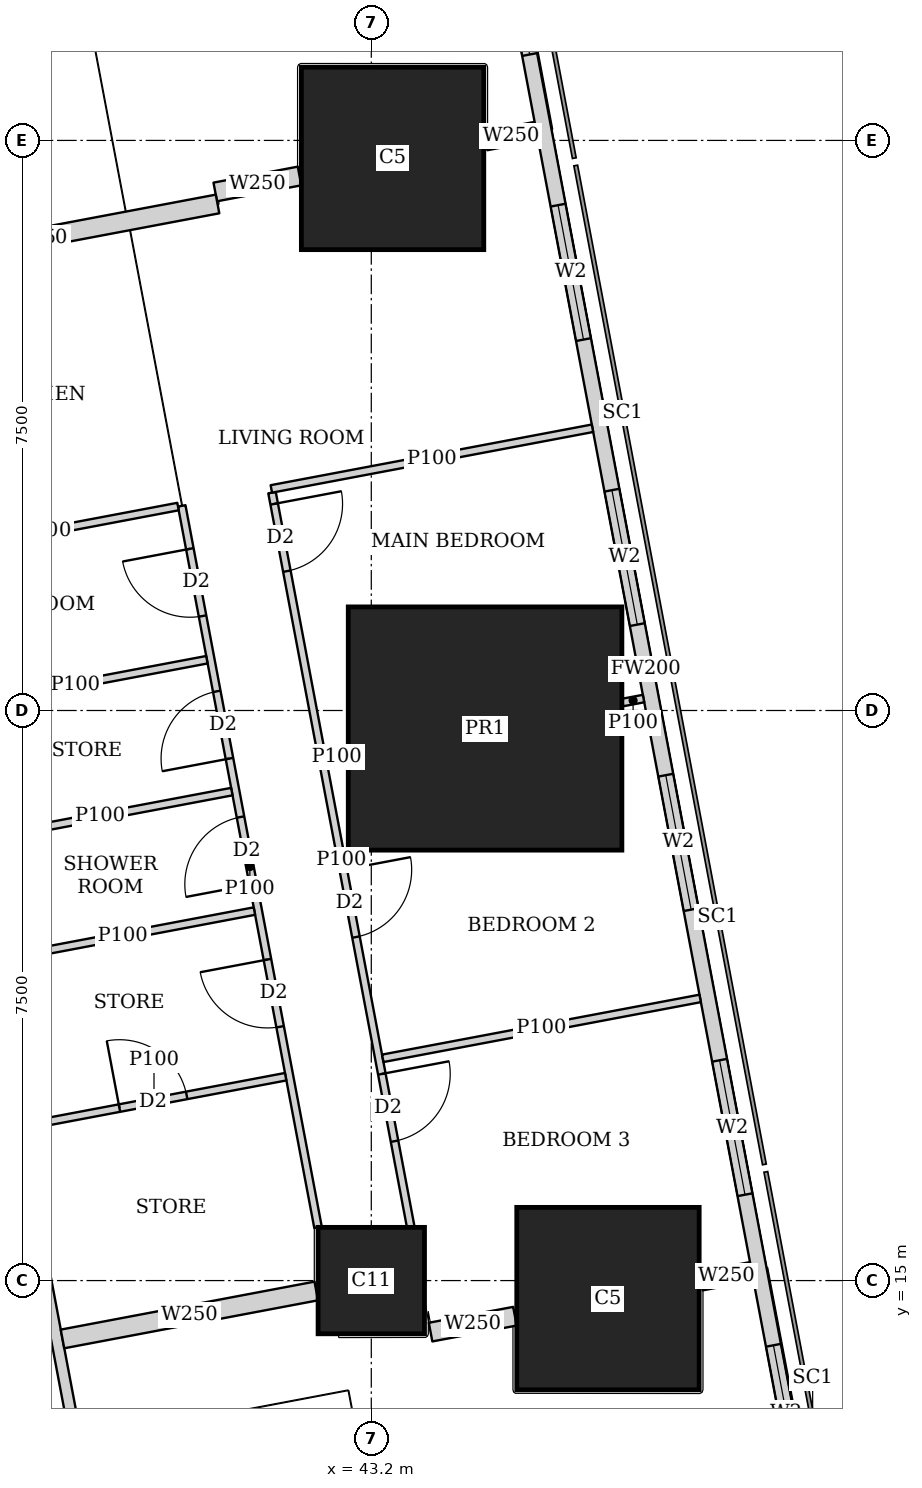
"""IFC4 building model, lengths in metres.
Left out: names, types, materials, properties, quantities, classifications, styles, units other than length and angle.
Written with IfcOpenShell. Run it as: python <this file> out.ifc"""

import sys

from ifc_helpers import new_model, si_unit, direction, frame, frame_2d, origin, origin_2d, place, context, subcontext, project, spatial, rectangle, extrude, element, fill, save


model = new_model("IFC4")
c1 = context("Model", 3, precision=1e-05, world=origin(), true_north=direction((0.0, 1.0)))
c2 = subcontext(c1, "Body", "Model", "MODEL_VIEW")
j1 = project(units=[si_unit("LENGTHUNIT", "METRE"), si_unit("PLANEANGLEUNIT", "RADIAN")], contexts=[c1])
p1 = place(None, origin())
s1 = spatial("IfcSite", under=j1, at=p1, CompositionType="ELEMENT")
p2 = place(p1, origin())
s2 = spatial("IfcBuilding", under=s1, at=p2, CompositionType="ELEMENT")
p3 = place(p2, frame((0.0, 0.0, 212.45)))
s3 = spatial("IfcBuildingStorey", under=s2, at=p3, CompositionType="ELEMENT", Elevation=212.45)
p4 = place(p3, frame((43.2, 15.0, 0.0), z_axis=(0.0, 0.0, 1.0), x_axis=(1.0, 0.0, 0.0)))
e1 = element("IfcColumn", 1, at=p4, inside=s3, PredefinedType="COLUMN", context=c2, shape_type="SweptSolid", body=[
    extrude(rectangle(XDim=1.4, YDim=1.4, at=origin_2d()), origin(), (0.0, 0.0, 1.0), 3.75),
])
p5 = place(p3, frame((46.314, 14.763, 0.0), z_axis=(0.0, 0.0, 1.0), x_axis=(1.0, 0.0, 0.0)))
e2 = element("IfcColumn", 2, at=p5, inside=s3, PredefinedType="COLUMN", context=c2, shape_type="SweptSolid", body=[
    extrude(rectangle(XDim=2.4, YDim=2.4, at=origin_2d()), origin(), (0.0, 0.0, 1.0), 3.75),
])
p6 = place(p3, frame((44.697, 22.263, 0.0), z_axis=(0.0, 0.0, 1.0), x_axis=(1.0, 0.0, 0.0)))
e3 = element("IfcColumn", 3, at=p6, inside=s3, PredefinedType="COLUMN", context=c2, shape_type="SweptSolid", body=[
    extrude(rectangle(XDim=3.6, YDim=3.2, at=origin_2d()), origin(), (0.0, 0.0, 1.0), 3.75),
])
p7 = place(p3, frame((43.48, 29.763, 0.0), z_axis=(0.0, 0.0, 1.0), x_axis=(1.0, 0.0, 0.0)))
e4 = element("IfcColumn", 4, at=p7, inside=s3, PredefinedType="COLUMN", context=c2, shape_type="SweptSolid", body=[
    extrude(rectangle(XDim=2.4, YDim=2.4, at=origin_2d()), origin(), (0.0, 0.0, 1.0), 3.75),
])
p8 = place(p3, frame((50.653, 2.703, 0.0), z_axis=(0.0, 0.0, 1.0), x_axis=(-0.185612026696, 0.982623109613, 0.0)))
e5 = element("IfcWall", 5, at=p8, inside=s3, PredefinedType="SOLIDWALL", context=c2, shape_type="SweptSolid", body=[
    extrude(rectangle(XDim=41.393, YDim=0.2, at=frame_2d((20.697, 0.0))), origin(), (0.0, 0.0, 1.0), 3.5),
])
p9 = place(p8, frame((1.633, 0.0, 0.9)))
e6 = element("IfcOpeningElement", 6, at=p9, cuts=e5, PredefinedType="OPENING", context=c2, shape_type="SweptSolid", body=[
    extrude(rectangle(XDim=1.8, YDim=1.5, at=frame_2d((0.9, 0.75))), frame((0.0, 0.11, 0.0), z_axis=(0.0, -1.0, 0.0), x_axis=(1.0, 0.0, 0.0)), (0.0, 0.0, 1.0), 0.22),
])
p10 = place(p8, frame((6.032, 0.0, 0.9)))
e7 = element("IfcOpeningElement", 7, at=p10, cuts=e5, PredefinedType="OPENING", context=c2, shape_type="SweptSolid", body=[
    extrude(rectangle(XDim=1.8, YDim=1.5, at=frame_2d((0.9, 0.75))), frame((0.0, 0.11, 0.0), z_axis=(0.0, -1.0, 0.0), x_axis=(1.0, 0.0, 0.0)), (0.0, 0.0, 1.0), 0.22),
])
p11 = place(p8, frame((9.848, 0.0, 0.9)))
e8 = element("IfcOpeningElement", 8, at=p11, cuts=e5, PredefinedType="OPENING", context=c2, shape_type="SweptSolid", body=[
    extrude(rectangle(XDim=1.8, YDim=1.5, at=frame_2d((0.9, 0.75))), frame((0.0, 0.11, 0.0), z_axis=(0.0, -1.0, 0.0), x_axis=(1.0, 0.0, 0.0)), (0.0, 0.0, 1.0), 0.22),
])
p12 = place(p8, frame((13.664, 0.0, 0.9)))
e9 = element("IfcOpeningElement", 9, at=p12, cuts=e5, PredefinedType="OPENING", context=c2, shape_type="SweptSolid", body=[
    extrude(rectangle(XDim=1.8, YDim=1.5, at=frame_2d((0.9, 0.75))), frame((0.0, 0.11, 0.0), z_axis=(0.0, -1.0, 0.0), x_axis=(1.0, 0.0, 0.0)), (0.0, 0.0, 1.0), 0.22),
])
p13 = place(p8, frame((17.481, 0.0, 0.9)))
e10 = element("IfcOpeningElement", 10, at=p13, cuts=e5, PredefinedType="OPENING", context=c2, shape_type="SweptSolid", body=[
    extrude(rectangle(XDim=1.8, YDim=1.5, at=frame_2d((0.9, 0.75))), frame((0.0, 0.11, 0.0), z_axis=(0.0, -1.0, 0.0), x_axis=(1.0, 0.0, 0.0)), (0.0, 0.0, 1.0), 0.22),
])
p14 = place(p8, frame((21.297, 0.0, 0.9)))
e11 = element("IfcOpeningElement", 11, at=p14, cuts=e5, PredefinedType="OPENING", context=c2, shape_type="SweptSolid", body=[
    extrude(rectangle(XDim=1.8, YDim=1.5, at=frame_2d((0.9, 0.75))), frame((0.0, 0.11, 0.0), z_axis=(0.0, -1.0, 0.0), x_axis=(1.0, 0.0, 0.0)), (0.0, 0.0, 1.0), 0.22),
])
p15 = place(p8, frame((25.113, 0.0, 0.9)))
e12 = element("IfcOpeningElement", 12, at=p15, cuts=e5, PredefinedType="OPENING", context=c2, shape_type="SweptSolid", body=[
    extrude(rectangle(XDim=1.8, YDim=1.5, at=frame_2d((0.9, 0.75))), frame((0.0, 0.11, 0.0), z_axis=(0.0, -1.0, 0.0), x_axis=(1.0, 0.0, 0.0)), (0.0, 0.0, 1.0), 0.22),
])
p16 = place(p8, frame((28.93, 0.0, 0.9)))
e13 = element("IfcOpeningElement", 13, at=p16, cuts=e5, PredefinedType="OPENING", context=c2, shape_type="SweptSolid", body=[
    extrude(rectangle(XDim=1.8, YDim=1.5, at=frame_2d((0.9, 0.75))), frame((0.0, 0.11, 0.0), z_axis=(0.0, -1.0, 0.0), x_axis=(1.0, 0.0, 0.0)), (0.0, 0.0, 1.0), 0.22),
])
p17 = place(p8, frame((32.746, 0.0, 0.9)))
e14 = element("IfcOpeningElement", 14, at=p17, cuts=e5, PredefinedType="OPENING", context=c2, shape_type="SweptSolid", body=[
    extrude(rectangle(XDim=1.8, YDim=1.5, at=frame_2d((0.9, 0.75))), frame((0.0, 0.11, 0.0), z_axis=(0.0, -1.0, 0.0), x_axis=(1.0, 0.0, 0.0)), (0.0, 0.0, 1.0), 0.22),
])
p18 = place(p8, frame((36.481, 0.0, 0.9)))
e15 = element("IfcOpeningElement", 15, at=p18, cuts=e5, PredefinedType="OPENING", context=c2, shape_type="SweptSolid", body=[
    extrude(rectangle(XDim=1.8, YDim=1.5, at=frame_2d((0.9, 0.75))), frame((0.0, 0.11, 0.0), z_axis=(0.0, -1.0, 0.0), x_axis=(1.0, 0.0, 0.0)), (0.0, 0.0, 1.0), 0.22),
])
p19 = place(p3, frame((33.68, 42.723, 0.0), z_axis=(0.0, 0.0, 1.0), x_axis=(0.185601160014, -0.982625162207, 0.0)))
e16 = element("IfcWall", 16, at=p19, inside=s3, PredefinedType="SOLIDWALL", context=c2, shape_type="SweptSolid", body=[
    extrude(rectangle(XDim=41.051, YDim=0.15, at=frame_2d((20.526, 0.0))), origin(), (0.0, 0.0, 1.0), 2.5),
])
p20 = place(p19, frame((12.307, 0.0, 0.0)))
e17 = element("IfcOpeningElement", 17, at=p20, cuts=e16, PredefinedType="OPENING", context=c2, shape_type="SweptSolid", body=[
    extrude(rectangle(XDim=1.0, YDim=2.1, at=frame_2d((0.5, 1.05))), frame((0.0, 0.085, 0.0), z_axis=(0.0, -1.0, 0.0), x_axis=(1.0, 0.0, 0.0)), (0.0, 0.0, 1.0), 0.17),
])
p21 = place(p19, frame((16.123, 0.0, 0.0)))
e18 = element("IfcOpeningElement", 18, at=p21, cuts=e16, PredefinedType="OPENING", context=c2, shape_type="SweptSolid", body=[
    extrude(rectangle(XDim=1.0, YDim=2.1, at=frame_2d((0.5, 1.05))), frame((0.0, 0.085, 0.0), z_axis=(0.0, -1.0, 0.0), x_axis=(1.0, 0.0, 0.0)), (0.0, 0.0, 1.0), 0.17),
])
p22 = place(p19, frame((30.902, 0.0, 0.0)))
e19 = element("IfcOpeningElement", 19, at=p22, cuts=e16, PredefinedType="OPENING", context=c2, shape_type="SweptSolid", body=[
    extrude(rectangle(XDim=1.0, YDim=2.1, at=frame_2d((0.5, 1.05))), frame((0.0, 0.085, 0.0), z_axis=(0.0, -1.0, 0.0), x_axis=(1.0, 0.0, 0.0)), (0.0, 0.0, 1.0), 0.17),
])
p23 = place(p3, frame((41.894, 25.366, 0.0), z_axis=(0.0, 0.0, 1.0), x_axis=(0.185612905165, -0.982622943675, 0.0)))
e20 = element("IfcWall", 20, at=p23, inside=s3, PredefinedType="PARTITIONING", context=c2, shape_type="SweptSolid", body=[
    extrude(rectangle(XDim=9.827, YDim=0.1, at=frame_2d((4.913, 0.0))), origin(), (0.0, 0.0, 1.0), 2.5),
])
p24 = place(p23, frame((0.151, 0.0, 0.0)))
e21 = element("IfcOpeningElement", 21, at=p24, cuts=e20, PredefinedType="OPENING", context=c2, shape_type="SweptSolid", body=[
    extrude(rectangle(XDim=0.9, YDim=2.1, at=frame_2d((0.45, 1.05))), frame((0.0, 0.06, 0.0), z_axis=(0.0, -1.0, 0.0), x_axis=(1.0, 0.0, 0.0)), (0.0, 0.0, 1.0), 0.12),
])
p25 = place(p23, frame((5.05, 0.0, 0.0)))
e22 = element("IfcOpeningElement", 22, at=p25, cuts=e20, PredefinedType="OPENING", context=c2, shape_type="SweptSolid", body=[
    extrude(rectangle(XDim=0.9, YDim=2.1, at=frame_2d((0.45, 1.05))), frame((0.0, 0.06, 0.0), z_axis=(0.0, -1.0, 0.0), x_axis=(1.0, 0.0, 0.0)), (0.0, 0.0, 1.0), 0.12),
])
p26 = place(p23, frame((7.783, 0.0, 0.0)))
e23 = element("IfcOpeningElement", 23, at=p26, cuts=e20, PredefinedType="OPENING", context=c2, shape_type="SweptSolid", body=[
    extrude(rectangle(XDim=0.9, YDim=2.1, at=frame_2d((0.45, 1.05))), frame((0.0, 0.06, 0.0), z_axis=(0.0, -1.0, 0.0), x_axis=(1.0, 0.0, 0.0)), (0.0, 0.0, 1.0), 0.12),
])
p27 = place(p3, frame((40.706, 25.192, 0.0), z_axis=(0.0, 0.0, 1.0), x_axis=(0.185629824463, -0.982619747547, 0.0)))
e24 = element("IfcWall", 24, at=p27, inside=s3, PredefinedType="PARTITIONING", context=c2, shape_type="SweptSolid", body=[
    extrude(rectangle(XDim=9.659, YDim=0.1, at=frame_2d((4.83, 0.0))), origin(), (0.0, 0.0, 1.0), 2.5),
])
p28 = place(p27, frame((0.575, 0.0, 0.0)))
e25 = element("IfcOpeningElement", 25, at=p28, cuts=e24, PredefinedType="OPENING", context=c2, shape_type="SweptSolid", body=[
    extrude(rectangle(XDim=0.9, YDim=2.1, at=frame_2d((0.45, 1.05))), frame((0.0, 0.06, 0.0), z_axis=(0.0, -1.0, 0.0), x_axis=(1.0, 0.0, 0.0)), (0.0, 0.0, 1.0), 0.12),
])
p29 = place(p27, frame((4.166, 0.0, 0.0)))
e26 = element("IfcOpeningElement", 26, at=p29, cuts=e24, PredefinedType="OPENING", context=c2, shape_type="SweptSolid", body=[
    extrude(rectangle(XDim=0.9, YDim=2.1, at=frame_2d((0.45, 1.05))), frame((0.0, 0.06, 0.0), z_axis=(0.0, -1.0, 0.0), x_axis=(1.0, 0.0, 0.0)), (0.0, 0.0, 1.0), 0.12),
])
p30 = place(p27, frame((2.483, 0.0, 0.0)))
e27 = element("IfcOpeningElement", 27, at=p30, cuts=e24, PredefinedType="OPENING", context=c2, shape_type="SweptSolid", body=[
    extrude(rectangle(XDim=0.9, YDim=2.1, at=frame_2d((0.45, 1.05))), frame((0.0, 0.06, 0.0), z_axis=(0.0, -1.0, 0.0), x_axis=(1.0, 0.0, 0.0)), (0.0, 0.0, 1.0), 0.12),
])
p31 = place(p27, frame((6.074, 0.0, 0.0)))
e28 = element("IfcOpeningElement", 28, at=p31, cuts=e24, PredefinedType="OPENING", context=c2, shape_type="SweptSolid", body=[
    extrude(rectangle(XDim=0.9, YDim=2.1, at=frame_2d((0.45, 1.05))), frame((0.0, 0.06, 0.0), z_axis=(0.0, -1.0, 0.0), x_axis=(1.0, 0.0, 0.0)), (0.0, 0.0, 1.0), 0.12),
])
p32 = place(p3, frame((46.11, 26.213, 0.0), z_axis=(0.0, 0.0, 1.0), x_axis=(-0.982633535512, -0.185556823879, 0.0)))
e29 = element("IfcWall", 29, at=p32, inside=s3, PredefinedType="PARTITIONING", context=c2, shape_type="SweptSolid", body=[
    extrude(rectangle(XDim=4.3, YDim=0.1, at=frame_2d((2.15, 0.0))), origin(), (0.0, 0.0, 1.0), 2.05),
])
p33 = place(p3, frame((46.782, 22.657, 0.0), z_axis=(0.0, 0.0, 1.0), x_axis=(-0.982574553168, -0.185868898601, 0.0)))
e30 = element("IfcWall", 30, at=p33, inside=s3, PredefinedType="PARTITIONING", context=c2, shape_type="SweptSolid", body=[
    extrude(rectangle(XDim=0.28, YDim=0.1, at=frame_2d((0.14, 0.0))), origin(), (0.0, 0.0, 1.0), 3.5),
])
p34 = place(p3, frame((42.887, 21.921, 0.0), z_axis=(0.0, 0.0, 1.0), x_axis=(-0.982688058078, -0.185267861514, 0.0)))
e31 = element("IfcWall", 31, at=p34, inside=s3, PredefinedType="PARTITIONING", context=c2, shape_type="SweptSolid", body=[
    extrude(rectangle(XDim=0.286, YDim=0.1, at=frame_2d((0.143, 0.0))), origin(), (0.0, 0.0, 1.0), 2.5),
])
p35 = place(p3, frame((47.527, 18.712, 0.0), z_axis=(0.0, 0.0, 1.0), x_axis=(-0.982665405803, -0.185387972203, 0.0)))
e32 = element("IfcWall", 32, at=p35, inside=s3, PredefinedType="PARTITIONING", context=c2, shape_type="SweptSolid", body=[
    extrude(rectangle(XDim=4.25, YDim=0.1, at=frame_2d((2.125, 0.0))), origin(), (0.0, 0.0, 1.0), 2.05),
])
p36 = place(p3, frame((40.657, 25.183, 0.0), z_axis=(0.0, 0.0, 1.0), x_axis=(-0.982585626838, -0.185810349366, 0.0)))
e33 = element("IfcWall", 33, at=p36, inside=s3, PredefinedType="PARTITIONING", context=c2, shape_type="SweptSolid", body=[
    extrude(rectangle(XDim=3.525, YDim=0.1, at=frame_2d((1.763, 0.0))), origin(), (0.0, 0.0, 1.0), 3.5),
])
p37 = place(p3, frame((41.365, 21.433, 0.0), z_axis=(0.0, 0.0, 1.0), x_axis=(-0.982638553676, -0.185530247748, 0.0)))
e34 = element("IfcWall", 34, at=p37, inside=s3, PredefinedType="PARTITIONING", context=c2, shape_type="SweptSolid", body=[
    extrude(rectangle(XDim=3.525, YDim=0.1, at=frame_2d((1.763, 0.0))), origin(), (0.0, 0.0, 1.0), 3.5),
])
p38 = place(p3, frame((42.073, 17.682, 0.0), z_axis=(0.0, 0.0, 1.0), x_axis=(-0.98265117712, -0.185463376723, 0.0)))
e35 = element("IfcWall", 35, at=p38, inside=s3, PredefinedType="PARTITIONING", context=c2, shape_type="SweptSolid", body=[
    extrude(rectangle(XDim=3.525, YDim=0.1, at=frame_2d((1.763, 0.0))), origin(), (0.0, 0.0, 1.0), 3.5),
])
p39 = place(p38, frame((1.325, 0.0, 0.0)))
e36 = element("IfcOpeningElement", 36, at=p39, cuts=e35, PredefinedType="OPENING", context=c2, shape_type="SweptSolid", body=[
    extrude(rectangle(XDim=0.9, YDim=2.1, at=frame_2d((0.45, 1.05))), frame((0.0, 0.06, 0.0), z_axis=(0.0, -1.0, 0.0), x_axis=(1.0, 0.0, 0.0)), (0.0, 0.0, 1.0), 0.12),
])
p40 = place(p3, frame((41.037, 23.168, 0.0), z_axis=(0.0, 0.0, 1.0), x_axis=(-0.982638553676, -0.185530247748, 0.0)))
e37 = element("IfcWall", 37, at=p40, inside=s3, PredefinedType="PARTITIONING", context=c2, shape_type="SweptSolid", body=[
    extrude(rectangle(XDim=3.525, YDim=0.1, at=frame_2d((1.763, 0.0))), origin(), (0.0, 0.0, 1.0), 2.5),
])
p41 = place(p3, frame((41.662, 19.861, 0.0), z_axis=(0.0, 0.0, 1.0), x_axis=(-0.982588017646, -0.185797706064, 0.0)))
e38 = element("IfcWall", 38, at=p41, inside=s3, PredefinedType="PARTITIONING", context=c2, shape_type="SweptSolid", body=[
    extrude(rectangle(XDim=3.525, YDim=0.1, at=frame_2d((1.763, 0.0))), origin(), (0.0, 0.0, 1.0), 3.5),
])
p42 = place(p3, frame((45.372, 30.121, 0.0), z_axis=(0.0, 0.0, 1.0), x_axis=(-0.982347993061, -0.187062611252, 0.0)))
e39 = element("IfcWall", 39, at=p42, inside=s3, PredefinedType="SOLIDWALL", context=c2, shape_type="SweptSolid", body=[
    extrude(rectangle(XDim=0.68, YDim=0.25, at=frame_2d((0.34, 0.0))), origin(), (0.0, 0.0, 1.0), 2.05),
])
p43 = place(p3, frame((42.256, 29.532, 0.0), z_axis=(0.0, 0.0, 1.0), x_axis=(-0.982549954272, -0.185998890749, 0.0)))
e40 = element("IfcWall", 40, at=p43, inside=s3, PredefinedType="SOLIDWALL", context=c2, shape_type="SweptSolid", body=[
    extrude(rectangle(XDim=1.129, YDim=0.25, at=frame_2d((0.564, 0.0))), origin(), (0.0, 0.0, 1.0), 2.05),
])
p44 = place(p3, frame((41.177, 29.164, 0.0), z_axis=(0.0, 0.0, 1.0), x_axis=(-0.982642846239, -0.185507511263, 0.0)))
e41 = element("IfcWall", 41, at=p44, inside=s3, PredefinedType="SOLIDWALL", context=c2, shape_type="SweptSolid", body=[
    extrude(rectangle(XDim=4.776, YDim=0.25, at=frame_2d((2.388, 0.0))), origin(), (0.0, 0.0, 1.0), 2.5),
])
p45 = place(p3, frame((48.206, 15.12, 0.0), z_axis=(0.0, 0.0, 1.0), x_axis=(-0.982610999048, -0.18567612811, 0.0)))
e42 = element("IfcWall", 42, at=p45, inside=s3, PredefinedType="SOLIDWALL", context=c2, shape_type="SweptSolid", body=[
    extrude(rectangle(XDim=0.68, YDim=0.25, at=frame_2d((0.34, 0.0))), origin(), (0.0, 0.0, 1.0), 2.05),
])
p46 = place(p3, frame((45.09, 14.531, 0.0), z_axis=(0.0, 0.0, 1.0), x_axis=(-0.982737354171, -0.185006196431, 0.0)))
e43 = element("IfcWall", 43, at=p46, inside=s3, PredefinedType="SOLIDWALL", context=c2, shape_type="SweptSolid", body=[
    extrude(rectangle(XDim=1.13, YDim=0.25, at=frame_2d((0.565, 0.0))), origin(), (0.0, 0.0, 1.0), 2.05),
])
p47 = place(p3, frame((42.476, 14.863, 0.0), z_axis=(0.0, 0.0, 1.0), x_axis=(-0.982603567712, -0.185715450942, 0.0)))
e44 = element("IfcWall", 44, at=p47, inside=s3, PredefinedType="SOLIDWALL", context=c2, shape_type="SweptSolid", body=[
    extrude(rectangle(XDim=3.398, YDim=0.25, at=frame_2d((1.699, 0.0))), origin(), (0.0, 0.0, 1.0), 3.5),
])
p48 = place(p11, origin())
e45 = element("IfcWindow", 45, at=p48, inside=s3, PartitioningType="SINGLE_PANEL", PredefinedType="WINDOW", context=c2, shape_type="SweptSolid", body=[
    extrude(rectangle(XDim=1.8, YDim=1.5, at=frame_2d((0.9, 0.75))), frame((0.0, 0.03, 0.0), z_axis=(0.0, -1.0, 0.0), x_axis=(1.0, 0.0, 0.0)), (0.0, 0.0, 1.0), 0.06),
])
fill(e8, e45)
p49 = place(p12, origin())
e46 = element("IfcWindow", 46, at=p49, inside=s3, PartitioningType="SINGLE_PANEL", PredefinedType="WINDOW", context=c2, shape_type="SweptSolid", body=[
    extrude(rectangle(XDim=1.8, YDim=1.5, at=frame_2d((0.9, 0.75))), frame((0.0, 0.03, 0.0), z_axis=(0.0, -1.0, 0.0), x_axis=(1.0, 0.0, 0.0)), (0.0, 0.0, 1.0), 0.06),
])
fill(e9, e46)
p50 = place(p13, origin())
e47 = element("IfcWindow", 47, at=p50, inside=s3, PartitioningType="SINGLE_PANEL", PredefinedType="WINDOW", context=c2, shape_type="SweptSolid", body=[
    extrude(rectangle(XDim=1.8, YDim=1.5, at=frame_2d((0.9, 0.75))), frame((0.0, 0.03, 0.0), z_axis=(0.0, -1.0, 0.0), x_axis=(1.0, 0.0, 0.0)), (0.0, 0.0, 1.0), 0.06),
])
fill(e10, e47)
p51 = place(p14, origin())
e48 = element("IfcWindow", 48, at=p51, inside=s3, PartitioningType="SINGLE_PANEL", PredefinedType="WINDOW", context=c2, shape_type="SweptSolid", body=[
    extrude(rectangle(XDim=1.8, YDim=1.5, at=frame_2d((0.9, 0.75))), frame((0.0, 0.03, 0.0), z_axis=(0.0, -1.0, 0.0), x_axis=(1.0, 0.0, 0.0)), (0.0, 0.0, 1.0), 0.06),
])
fill(e11, e48)
p52 = place(p15, origin())
e49 = element("IfcWindow", 49, at=p52, inside=s3, PartitioningType="SINGLE_PANEL", PredefinedType="WINDOW", context=c2, shape_type="SweptSolid", body=[
    extrude(rectangle(XDim=1.8, YDim=1.5, at=frame_2d((0.9, 0.75))), frame((0.0, 0.03, 0.0), z_axis=(0.0, -1.0, 0.0), x_axis=(1.0, 0.0, 0.0)), (0.0, 0.0, 1.0), 0.06),
])
fill(e12, e49)
p53 = place(p16, origin())
e50 = element("IfcWindow", 50, at=p53, inside=s3, PartitioningType="SINGLE_PANEL", PredefinedType="WINDOW", context=c2, shape_type="SweptSolid", body=[
    extrude(rectangle(XDim=1.8, YDim=1.5, at=frame_2d((0.9, 0.75))), frame((0.0, 0.03, 0.0), z_axis=(0.0, -1.0, 0.0), x_axis=(1.0, 0.0, 0.0)), (0.0, 0.0, 1.0), 0.06),
])
fill(e13, e50)
p54 = place(p24, origin())
e51 = element("IfcDoor", 51, at=p54, inside=s3, OperationType="SINGLE_SWING_LEFT", PredefinedType="DOOR", context=c2, shape_type="SweptSolid", body=[
    extrude(rectangle(XDim=0.9, YDim=2.1, at=frame_2d((0.45, 1.05))), frame((0.0, 0.025, 0.0), z_axis=(0.0, -1.0, 0.0), x_axis=(1.0, 0.0, 0.0)), (0.0, 0.0, 1.0), 0.05),
])
fill(e21, e51)
p55 = place(p25, origin())
e52 = element("IfcDoor", 52, at=p55, inside=s3, OperationType="SINGLE_SWING_LEFT", PredefinedType="DOOR", context=c2, shape_type="SweptSolid", body=[
    extrude(rectangle(XDim=0.9, YDim=2.1, at=frame_2d((0.45, 1.05))), frame((0.0, 0.025, 0.0), z_axis=(0.0, -1.0, 0.0), x_axis=(1.0, 0.0, 0.0)), (0.0, 0.0, 1.0), 0.05),
])
fill(e22, e52)
p56 = place(p26, origin())
e53 = element("IfcDoor", 53, at=p56, inside=s3, OperationType="SINGLE_SWING_LEFT", PredefinedType="DOOR", context=c2, shape_type="SweptSolid", body=[
    extrude(rectangle(XDim=0.9, YDim=2.1, at=frame_2d((0.45, 1.05))), frame((0.0, 0.025, 0.0), z_axis=(0.0, -1.0, 0.0), x_axis=(1.0, 0.0, 0.0)), (0.0, 0.0, 1.0), 0.05),
])
fill(e23, e53)
p57 = place(p28, origin())
e54 = element("IfcDoor", 54, at=p57, inside=s3, OperationType="SINGLE_SWING_RIGHT", PredefinedType="DOOR", context=c2, shape_type="SweptSolid", body=[
    extrude(rectangle(XDim=0.9, YDim=2.1, at=frame_2d((0.45, 1.05))), frame((0.0, 0.025, 0.0), z_axis=(0.0, -1.0, 0.0), x_axis=(1.0, 0.0, 0.0)), (0.0, 0.0, 1.0), 0.05),
])
fill(e25, e54)
p58 = place(p29, origin())
e55 = element("IfcDoor", 55, at=p58, inside=s3, OperationType="SINGLE_SWING_LEFT", PredefinedType="DOOR", context=c2, shape_type="SweptSolid", body=[
    extrude(rectangle(XDim=0.9, YDim=2.1, at=frame_2d((0.45, 1.05))), frame((0.0, 0.025, 0.0), z_axis=(0.0, -1.0, 0.0), x_axis=(1.0, 0.0, 0.0)), (0.0, 0.0, 1.0), 0.05),
])
fill(e26, e55)
p59 = place(p30, origin())
e56 = element("IfcDoor", 56, at=p59, inside=s3, OperationType="SINGLE_SWING_LEFT", PredefinedType="DOOR", context=c2, shape_type="SweptSolid", body=[
    extrude(rectangle(XDim=0.9, YDim=2.1, at=frame_2d((0.45, 1.05))), frame((0.0, 0.025, 0.0), z_axis=(0.0, -1.0, 0.0), x_axis=(1.0, 0.0, 0.0)), (0.0, 0.0, 1.0), 0.05),
])
fill(e27, e56)
p60 = place(p31, origin())
e57 = element("IfcDoor", 57, at=p60, inside=s3, OperationType="SINGLE_SWING_RIGHT", PredefinedType="DOOR", context=c2, shape_type="SweptSolid", body=[
    extrude(rectangle(XDim=0.9, YDim=2.1, at=frame_2d((0.45, 1.05))), frame((0.0, 0.025, 0.0), z_axis=(0.0, -1.0, 0.0), x_axis=(1.0, 0.0, 0.0)), (0.0, 0.0, 1.0), 0.05),
])
fill(e28, e57)
p61 = place(p39, origin())
e58 = element("IfcDoor", 58, at=p61, inside=s3, OperationType="SINGLE_SWING_LEFT", PredefinedType="DOOR", context=c2, shape_type="SweptSolid", body=[
    extrude(rectangle(XDim=0.9, YDim=2.1, at=frame_2d((0.45, 1.05))), frame((0.0, 0.025, 0.0), z_axis=(0.0, -1.0, 0.0), x_axis=(1.0, 0.0, 0.0)), (0.0, 0.0, 1.0), 0.05),
])
fill(e36, e58)
save(model, sys.argv[1])
